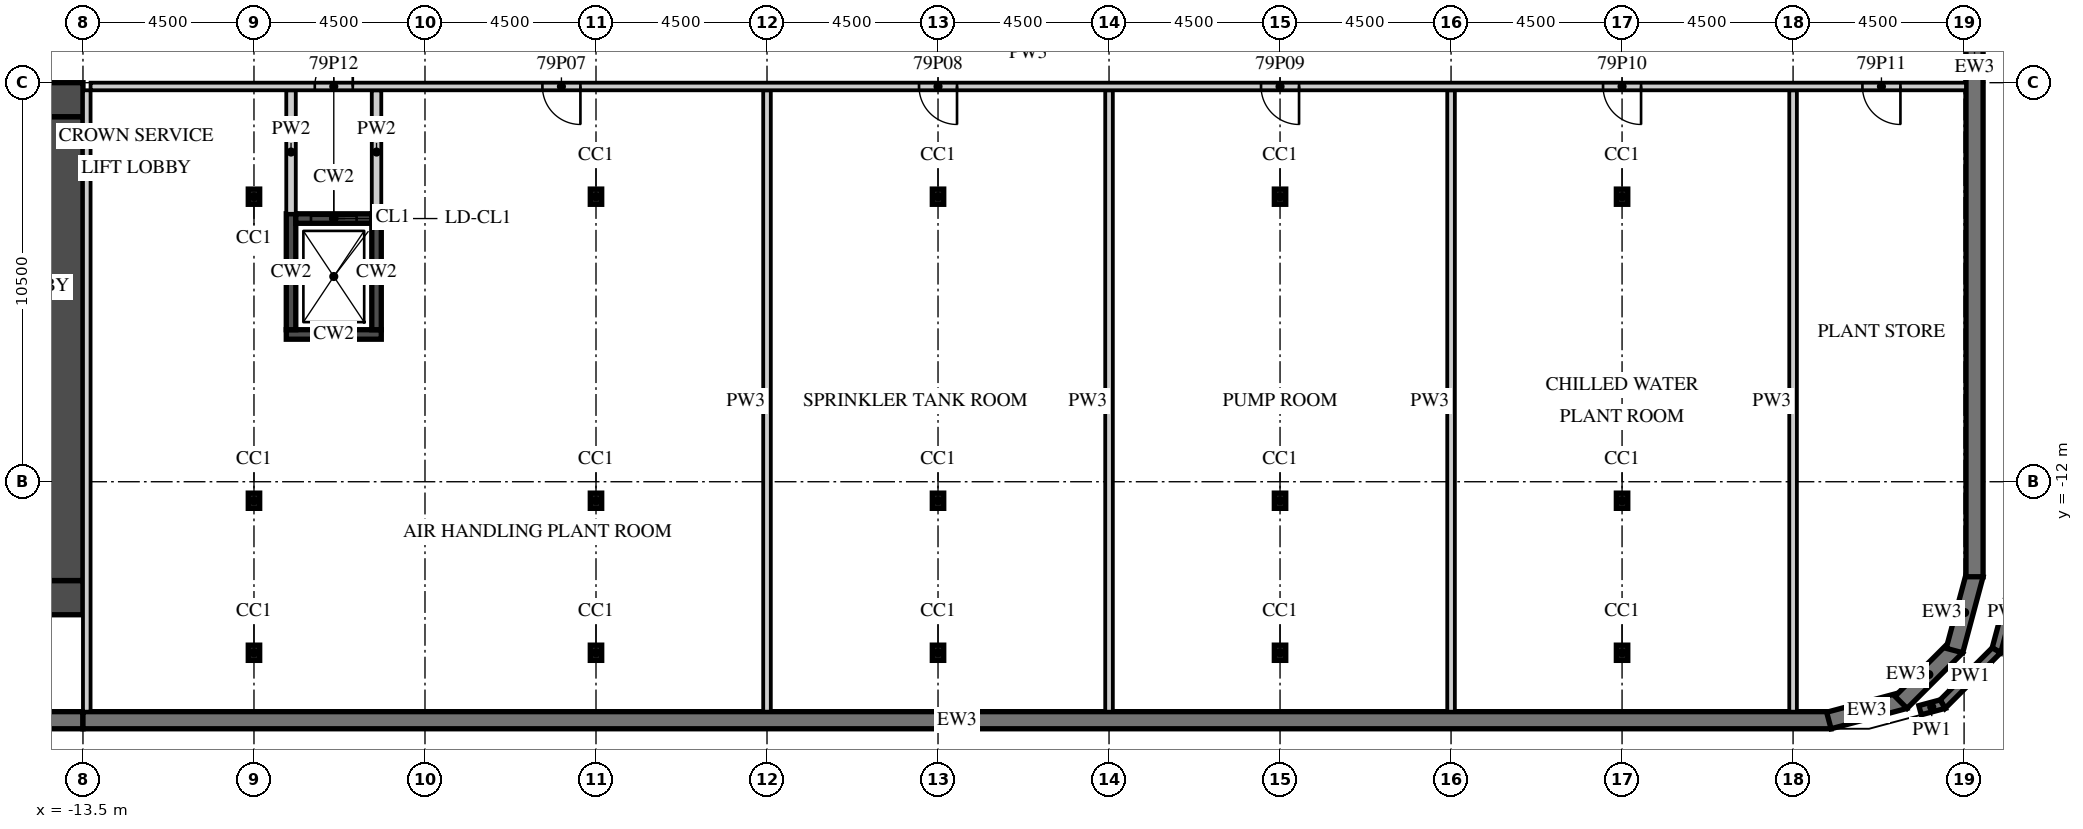
"""IFC4 building model, lengths in metres.
Left out: names, types, materials, properties, quantities, classifications, styles, units other than length and angle.
Written with IfcOpenShell. Run it as: python <this file> out.ifc"""

import sys

from ifc_helpers import new_model, si_unit, direction, frame, frame_2d, origin, origin_2d, place, context, subcontext, project, spatial, polyline, rectangle, i_section, outline, extrude, element, fill, save


model = new_model("IFC4")
c1 = context("Model", 3, precision=1e-05, world=origin(), true_north=direction((0.0, 1.0)))
c2 = subcontext(c1, "Body", "Model", "MODEL_VIEW")
j1 = project(units=[si_unit("LENGTHUNIT", "METRE"), si_unit("PLANEANGLEUNIT", "RADIAN")], contexts=[c1])
p1 = place(None, origin())
s1 = spatial("IfcSite", under=j1, at=p1, CompositionType="ELEMENT")
p2 = place(p1, origin())
s2 = spatial("IfcBuilding", under=s1, at=p2, CompositionType="ELEMENT")
p3 = place(p2, frame((0.0, 0.0, 313.6)))
s3 = spatial("IfcBuildingStorey", under=s2, at=p3, CompositionType="ELEMENT", Elevation=313.6)
for number, where, z_axis, x_axis in (
    (1, (-9.0, -16.5, 0.0), (0.0, 0.0, 1.0), (1.0, 0.0, 0.0)),
    (2, (-9.0, -12.5, 0.0), (0.0, 0.0, 1.0), (1.0, 0.0, 0.0)),
    (3, (-9.0, -4.5, 0.0), (0.0, 0.0, 1.0), (1.0, 0.0, 0.0)),
    (4, (0.0, -16.5, 0.0), (0.0, 0.0, 1.0), (1.0, 0.0, 0.0)),
    (5, (0.0, -12.5, 0.0), (0.0, 0.0, 1.0), (1.0, 0.0, 0.0)),
    (6, (0.0, -4.5, 0.0), (0.0, 0.0, 1.0), (1.0, 0.0, 0.0)),
    (7, (9.0, -16.5, 0.0), (0.0, 0.0, 1.0), (1.0, 0.0, 0.0)),
    (8, (9.0, -12.5, 0.0), (0.0, 0.0, 1.0), (1.0, 0.0, 0.0)),
    (9, (9.0, -4.5, 0.0), (0.0, 0.0, 1.0), (1.0, 0.0, 0.0)),
    (10, (18.0, -16.5, 0.0), (0.0, 0.0, 1.0), (1.0, 0.0, 0.0)),
    (11, (18.0, -12.5, 0.0), (0.0, 0.0, 1.0), (1.0, 0.0, 0.0)),
    (12, (18.0, -4.5, 0.0), (0.0, 0.0, 1.0), (1.0, 0.0, 0.0)),
    (13, (27.0, -16.5, 0.0), (0.0, 0.0, 1.0), (1.0, 0.0, 0.0)),
    (14, (27.0, -12.5, 0.0), (0.0, 0.0, 1.0), (1.0, 0.0, 0.0)),
    (15, (27.0, -4.5, 0.0), (0.0, 0.0, 1.0), (1.0, 0.0, 0.0)),
):
    element("IfcColumn", number, at=place(p3, frame(where, z_axis=z_axis, x_axis=x_axis)), inside=s3, PredefinedType="COLUMN", context=c2, shape_type="SweptSolid", body=[
        extrude(i_section(OverallWidth=0.3, OverallDepth=0.4, WebThickness=0.013, FlangeThickness=0.024, FilletRadius=0.027, at=origin_2d()), origin(), (0.0, 0.0, 1.0), 4.2),
    ])
p4 = place(p3, frame((-31.5, -18.275, 0.0), z_axis=(0.0, 0.0, 1.0), x_axis=(1.0, 0.0, 0.0)))
e16 = element("IfcWall", 16, at=p4, inside=s3, PredefinedType="SOLIDWALL", context=c2, shape_type="SweptSolid", body=[
    extrude(rectangle(XDim=18.0, YDim=0.45, at=frame_2d((9.0, 0.0))), origin(), (0.0, 0.0, 1.0), 3.8),
])
p5 = place(p3, frame((-13.5, -18.275, 0.0), z_axis=(0.0, 0.0, 1.0), x_axis=(1.0, 0.0, 0.0)))
e17 = element("IfcWall", 17, at=p5, inside=s3, PredefinedType="SOLIDWALL", context=c2, shape_type="SweptSolid", body=[
    extrude(rectangle(XDim=46.0, YDim=0.45, at=frame_2d((23.0, 0.0))), origin(), (0.0, 0.0, 1.0), 3.8),
])
p6 = place(p3, frame((32.442, -18.283, 0.0), z_axis=(0.0, 0.0, 1.0), x_axis=(0.965926999034, 0.25881466832, 0.0)))
e18 = element("IfcWall", 18, at=p6, inside=s3, PredefinedType="SOLIDWALL", context=c2, shape_type="SweptSolid", body=[
    extrude(outline(polyline([(0.0, -0.225), (2.071, -0.225), (1.95, 0.225), (0.121, 0.225), (0.0, -0.225)])), origin(), (0.0, 0.0, 1.0), 3.8),
])
p7 = place(p3, frame((34.341, -17.805, 0.0), z_axis=(0.0, 0.0, 1.0), x_axis=(0.707106781187, 0.707106781187, 0.0)))
e19 = element("IfcWall", 19, at=p7, inside=s3, PredefinedType="SOLIDWALL", context=c2, shape_type="SweptSolid", body=[
    extrude(outline(polyline([(0.0, -0.225), (2.071, -0.225), (1.95, 0.225), (0.121, 0.225), (0.0, -0.225)])), origin(), (0.0, 0.0, 1.0), 3.8),
])
p8 = place(p3, frame((35.747, -16.442, 0.0), z_axis=(0.0, 0.0, 1.0), x_axis=(0.25881466832, 0.965926999034, 0.0)))
e20 = element("IfcWall", 20, at=p8, inside=s3, PredefinedType="SOLIDWALL", context=c2, shape_type="SweptSolid", body=[
    extrude(outline(polyline([(-0.0, -0.225), (2.07, -0.225), (1.95, 0.225), (0.12, 0.225), (-0.0, -0.225)])), origin(), (0.0, 0.0, 1.0), 3.8),
])
p9 = place(p3, frame((36.275, -14.5, 0.0), z_axis=(0.0, 0.0, 1.0), x_axis=(0.0, 1.0, 0.0)))
e21 = element("IfcWall", 21, at=p9, inside=s3, PredefinedType="SOLIDWALL", context=c2, shape_type="SweptSolid", body=[
    extrude(rectangle(XDim=28.0, YDim=0.45, at=frame_2d((14.0, 0.0))), origin(), (0.0, 0.0, 1.0), 3.8),
])
p10 = place(p3, origin())
e22 = element("IfcWall", 22, at=p10, inside=s3, PredefinedType="PARAPET", context=c2, shape_type="SweptSolid", body=[
    extrude(outline(polyline([(37.5, -14.5), (37.25, -14.467), (36.74, -16.371), (36.964, -16.5), (37.5, -14.5)])), origin(), (0.0, 0.0, 1.0), 1.1),
])
p11 = place(p3, origin())
e23 = element("IfcWall", 23, at=p11, inside=s3, PredefinedType="PARAPET", context=c2, shape_type="SweptSolid", body=[
    extrude(outline(polyline([(36.964, -16.5), (36.74, -16.371), (35.371, -17.74), (35.5, -17.964), (36.964, -16.5)])), origin(), (0.0, 0.0, 1.0), 1.1),
])
p12 = place(p3, origin())
e24 = element("IfcWall", 24, at=p12, inside=s3, PredefinedType="PARAPET", context=c2, shape_type="SweptSolid", body=[
    extrude(outline(polyline([(35.5, -17.964), (35.371, -17.74), (34.81, -17.89), (34.874, -18.132), (35.5, -17.964)])), origin(), (0.0, 0.0, 1.0), 1.1),
])
p13 = place(p3, frame((-8.15, -8.125, 0.0), z_axis=(0.0, 0.0, 1.0), x_axis=(1.0, 0.0, 0.0)))
e25 = element("IfcWall", 25, at=p13, inside=s3, PredefinedType="SHEAR", context=c2, shape_type="SweptSolid", body=[
    extrude(rectangle(XDim=2.5, YDim=0.25, at=frame_2d((1.25, 0.0))), origin(), (0.0, 0.0, 1.0), 3.8),
])
for number, where, z_axis, x_axis in (
    (26, (-8.025, -8.0, 0.0), (0.0, 0.0, 1.0), (0.0, 1.0, 0.0)),
    (27, (-5.775, -8.0, 0.0), (0.0, 0.0, 1.0), (0.0, 1.0, 0.0)),
):
    element("IfcWall", number, at=place(p3, frame(where, z_axis=z_axis, x_axis=x_axis)), inside=s3, PredefinedType="SHEAR", context=c2, shape_type="SweptSolid", body=[
        extrude(rectangle(XDim=3.05, YDim=0.25, at=frame_2d((1.525, 0.0))), origin(), (0.0, 0.0, 1.0), 3.8),
    ])
p14 = place(p3, frame((-7.9, -5.075, 0.0), z_axis=(0.0, 0.0, 1.0), x_axis=(1.0, 0.0, 0.0)))
e28 = element("IfcWall", 28, at=p14, inside=s3, PredefinedType="SHEAR", context=c2, shape_type="SweptSolid", body=[
    extrude(rectangle(XDim=2.0, YDim=0.25, at=frame_2d((1.0, 0.0))), origin(), (0.0, 0.0, 1.0), 3.8),
])
p15 = place(p14, frame((0.4, 0.0, 0.0)))
e29 = element("IfcOpeningElement", 29, at=p15, cuts=e28, PredefinedType="OPENING", context=c2, shape_type="SweptSolid", body=[
    extrude(rectangle(XDim=1.2, YDim=2.1, at=frame_2d((0.6, 1.05))), frame((0.0, 0.135, 0.0), z_axis=(0.0, -1.0, 0.0), x_axis=(1.0, 0.0, 0.0)), (0.0, 0.0, 1.0), 0.27),
])
for number, where, z_axis, x_axis in (
    (30, (-8.025, -4.95, 0.0), (0.0, 0.0, 1.0), (0.0, 1.0, 0.0)),
    (31, (-5.775, -4.95, 0.0), (0.0, 0.0, 1.0), (0.0, 1.0, 0.0)),
):
    element("IfcWall", number, at=place(p3, frame(where, z_axis=z_axis, x_axis=x_axis)), inside=s3, PredefinedType="PARTITIONING", context=c2, shape_type="SweptSolid", body=[
        extrude(rectangle(XDim=3.25, YDim=0.25, at=frame_2d((1.625, 0.0))), origin(), (0.0, 0.0, 1.0), 3.8),
    ])
p16 = place(p3, frame((-31.5, -1.95, 0.0), z_axis=(0.0, 0.0, 1.0), x_axis=(1.0, 0.0, 0.0)))
e32 = element("IfcWall", 32, at=p16, inside=s3, PredefinedType="SHEAR", context=c2, shape_type="SweptSolid", body=[
    extrude(rectangle(XDim=18.0, YDim=0.9, at=frame_2d((9.0, 0.0))), origin(), (0.0, 0.0, 1.0), 3.8),
])
p17 = place(p16, frame((14.725, 0.0, 0.0)))
e33 = element("IfcOpeningElement", 33, at=p17, cuts=e32, PredefinedType="OPENING", context=c2, shape_type="SweptSolid", body=[
    extrude(rectangle(XDim=1.8, YDim=2.1, at=frame_2d((0.9, 1.05))), frame((0.0, 0.46, 0.0), z_axis=(0.0, -1.0, 0.0), x_axis=(1.0, 0.0, 0.0)), (0.0, 0.0, 1.0), 0.92),
])
p18 = place(p3, frame((-20.3, -15.05, 0.0), z_axis=(0.0, 0.0, 1.0), x_axis=(1.0, 0.0, 0.0)))
e34 = element("IfcWall", 34, at=p18, inside=s3, PredefinedType="SHEAR", context=c2, shape_type="SweptSolid", body=[
    extrude(rectangle(XDim=6.8, YDim=0.9, at=frame_2d((3.4, 0.0))), origin(), (0.0, 0.0, 1.0), 3.8),
])
p19 = place(p18, frame((0.875, 0.0, 0.0)))
e35 = element("IfcOpeningElement", 35, at=p19, cuts=e34, PredefinedType="OPENING", context=c2, shape_type="SweptSolid", body=[
    extrude(rectangle(XDim=1.2, YDim=2.1, at=frame_2d((0.6, 1.05))), frame((0.0, 0.46, 0.0), z_axis=(0.0, -1.0, 0.0), x_axis=(1.0, 0.0, 0.0)), (0.0, 0.0, 1.0), 0.92),
])
p20 = place(p3, frame((-13.95, -14.6, 0.0), z_axis=(0.0, 0.0, 1.0), x_axis=(0.0, 1.0, 0.0)))
e36 = element("IfcWall", 36, at=p20, inside=s3, PredefinedType="SHEAR", context=c2, shape_type="SweptSolid", body=[
    extrude(rectangle(XDim=12.2, YDim=0.9, at=frame_2d((6.1, 0.0))), origin(), (0.0, 0.0, 1.0), 3.8),
])
for number, where, z_axis, x_axis in (
    (37, (4.5, -18.05, 0.0), (0.0, 0.0, 1.0), (0.0, 1.0, 0.0)),
    (38, (13.5, -18.05, 0.0), (0.0, 0.0, 1.0), (0.0, 1.0, 0.0)),
    (39, (22.5, -18.05, 0.0), (0.0, 0.0, 1.0), (0.0, 1.0, 0.0)),
    (40, (31.5, -18.05, 0.0), (0.0, 0.0, 1.0), (0.0, 1.0, 0.0)),
):
    element("IfcWall", number, at=place(p3, frame(where, z_axis=z_axis, x_axis=x_axis)), inside=s3, PredefinedType="PARTITIONING", context=c2, shape_type="SweptSolid", body=[
        extrude(rectangle(XDim=16.35, YDim=0.2, at=frame_2d((8.175, 0.0))), origin(), (0.0, 0.0, 1.0), 3.8),
    ])
p21 = place(p3, frame((-13.3, -1.6, 0.0), z_axis=(0.0, 0.0, 1.0), x_axis=(1.0, 0.0, 0.0)))
e41 = element("IfcWall", 41, at=p21, inside=s3, PredefinedType="PARTITIONING", context=c2, shape_type="SweptSolid", body=[
    extrude(rectangle(XDim=49.35, YDim=0.2, at=frame_2d((24.675, 0.0))), origin(), (0.0, 0.0, 1.0), 3.3),
])
p22 = place(p21, frame((11.89, 0.0, 0.0)))
e42 = element("IfcOpeningElement", 42, at=p22, cuts=e41, PredefinedType="OPENING", context=c2, shape_type="SweptSolid", body=[
    extrude(rectangle(XDim=1.0, YDim=2.1, at=frame_2d((0.5, 1.05))), frame((0.0, 0.11, 0.0), z_axis=(0.0, -1.0, 0.0), x_axis=(1.0, 0.0, 0.0)), (0.0, 0.0, 1.0), 0.22),
])
p23 = place(p21, frame((21.8, 0.0, 0.0)))
e43 = element("IfcOpeningElement", 43, at=p23, cuts=e41, PredefinedType="OPENING", context=c2, shape_type="SweptSolid", body=[
    extrude(rectangle(XDim=1.0, YDim=2.1, at=frame_2d((0.5, 1.05))), frame((0.0, 0.11, 0.0), z_axis=(0.0, -1.0, 0.0), x_axis=(1.0, 0.0, 0.0)), (0.0, 0.0, 1.0), 0.22),
])
p24 = place(p21, frame((30.8, 0.0, 0.0)))
e44 = element("IfcOpeningElement", 44, at=p24, cuts=e41, PredefinedType="OPENING", context=c2, shape_type="SweptSolid", body=[
    extrude(rectangle(XDim=1.0, YDim=2.1, at=frame_2d((0.5, 1.05))), frame((0.0, 0.11, 0.0), z_axis=(0.0, -1.0, 0.0), x_axis=(1.0, 0.0, 0.0)), (0.0, 0.0, 1.0), 0.22),
])
p25 = place(p21, frame((39.8, 0.0, 0.0)))
e45 = element("IfcOpeningElement", 45, at=p25, cuts=e41, PredefinedType="OPENING", context=c2, shape_type="SweptSolid", body=[
    extrude(rectangle(XDim=1.0, YDim=2.1, at=frame_2d((0.5, 1.05))), frame((0.0, 0.11, 0.0), z_axis=(0.0, -1.0, 0.0), x_axis=(1.0, 0.0, 0.0)), (0.0, 0.0, 1.0), 0.22),
])
p26 = place(p21, frame((46.625, 0.0, 0.0)))
e46 = element("IfcOpeningElement", 46, at=p26, cuts=e41, PredefinedType="OPENING", context=c2, shape_type="SweptSolid", body=[
    extrude(rectangle(XDim=1.0, YDim=2.1, at=frame_2d((0.5, 1.05))), frame((0.0, 0.11, 0.0), z_axis=(0.0, -1.0, 0.0), x_axis=(1.0, 0.0, 0.0)), (0.0, 0.0, 1.0), 0.22),
])
p27 = place(p21, frame((5.9, 0.0, 0.0)))
e47 = element("IfcOpeningElement", 47, at=p27, cuts=e41, PredefinedType="OPENING", context=c2, shape_type="SweptSolid", body=[
    extrude(rectangle(XDim=1.0, YDim=2.1, at=frame_2d((0.5, 1.05))), frame((0.0, 0.11, 0.0), z_axis=(0.0, -1.0, 0.0), x_axis=(1.0, 0.0, 0.0)), (0.0, 0.0, 1.0), 0.22),
])
p28 = place(p3, frame((-13.4, -18.05, 0.0), z_axis=(0.0, 0.0, 1.0), x_axis=(0.0, 1.0, 0.0)))
e48 = element("IfcWall", 48, at=p28, inside=s3, PredefinedType="PARTITIONING", context=c2, shape_type="SweptSolid", body=[
    extrude(rectangle(XDim=16.35, YDim=0.2, at=frame_2d((8.175, 0.0))), origin(), (0.0, 0.0, 1.0), 3.8),
])
p29 = place(p15, origin())
e49 = element("IfcDoor", 49, at=p29, inside=s3, OperationType="SLIDING_TO_LEFT", PredefinedType="DOOR", context=c2, shape_type="SweptSolid", body=[
    extrude(rectangle(XDim=1.2, YDim=2.1, at=frame_2d((0.6, 1.05))), frame((0.0, 0.025, 0.0), z_axis=(0.0, -1.0, 0.0), x_axis=(1.0, 0.0, 0.0)), (0.0, 0.0, 1.0), 0.05),
])
fill(e29, e49)
p30 = place(p22, origin())
e50 = element("IfcDoor", 50, at=p30, inside=s3, OperationType="SINGLE_SWING_RIGHT", PredefinedType="DOOR", context=c2, shape_type="SweptSolid", body=[
    extrude(rectangle(XDim=1.0, YDim=2.1, at=frame_2d((0.5, 1.05))), frame((0.0, 0.025, 0.0), z_axis=(0.0, -1.0, 0.0), x_axis=(1.0, 0.0, 0.0)), (0.0, 0.0, 1.0), 0.05),
])
fill(e42, e50)
p31 = place(p23, origin())
e51 = element("IfcDoor", 51, at=p31, inside=s3, OperationType="SINGLE_SWING_RIGHT", PredefinedType="DOOR", context=c2, shape_type="SweptSolid", body=[
    extrude(rectangle(XDim=1.0, YDim=2.1, at=frame_2d((0.5, 1.05))), frame((0.0, 0.025, 0.0), z_axis=(0.0, -1.0, 0.0), x_axis=(1.0, 0.0, 0.0)), (0.0, 0.0, 1.0), 0.05),
])
fill(e43, e51)
p32 = place(p24, origin())
e52 = element("IfcDoor", 52, at=p32, inside=s3, OperationType="SINGLE_SWING_RIGHT", PredefinedType="DOOR", context=c2, shape_type="SweptSolid", body=[
    extrude(rectangle(XDim=1.0, YDim=2.1, at=frame_2d((0.5, 1.05))), frame((0.0, 0.025, 0.0), z_axis=(0.0, -1.0, 0.0), x_axis=(1.0, 0.0, 0.0)), (0.0, 0.0, 1.0), 0.05),
])
fill(e44, e52)
p33 = place(p25, origin())
e53 = element("IfcDoor", 53, at=p33, inside=s3, OperationType="SINGLE_SWING_RIGHT", PredefinedType="DOOR", context=c2, shape_type="SweptSolid", body=[
    extrude(rectangle(XDim=1.0, YDim=2.1, at=frame_2d((0.5, 1.05))), frame((0.0, 0.025, 0.0), z_axis=(0.0, -1.0, 0.0), x_axis=(1.0, 0.0, 0.0)), (0.0, 0.0, 1.0), 0.05),
])
fill(e45, e53)
p34 = place(p26, origin())
e54 = element("IfcDoor", 54, at=p34, inside=s3, OperationType="SINGLE_SWING_RIGHT", PredefinedType="DOOR", context=c2, shape_type="SweptSolid", body=[
    extrude(rectangle(XDim=1.0, YDim=2.1, at=frame_2d((0.5, 1.05))), frame((0.0, 0.025, 0.0), z_axis=(0.0, -1.0, 0.0), x_axis=(1.0, 0.0, 0.0)), (0.0, 0.0, 1.0), 0.05),
])
fill(e46, e54)
p35 = place(p27, origin())
e55 = element("IfcDoor", 55, at=p35, inside=s3, OperationType="SINGLE_SWING_RIGHT", PredefinedType="DOOR", context=c2, shape_type="SweptSolid", body=[
    extrude(rectangle(XDim=1.0, YDim=2.1, at=frame_2d((0.5, 1.05))), frame((0.0, 0.025, 0.0), z_axis=(0.0, -1.0, 0.0), x_axis=(1.0, 0.0, 0.0)), (0.0, 0.0, 1.0), 0.05),
])
fill(e47, e55)
save(model, sys.argv[1])
